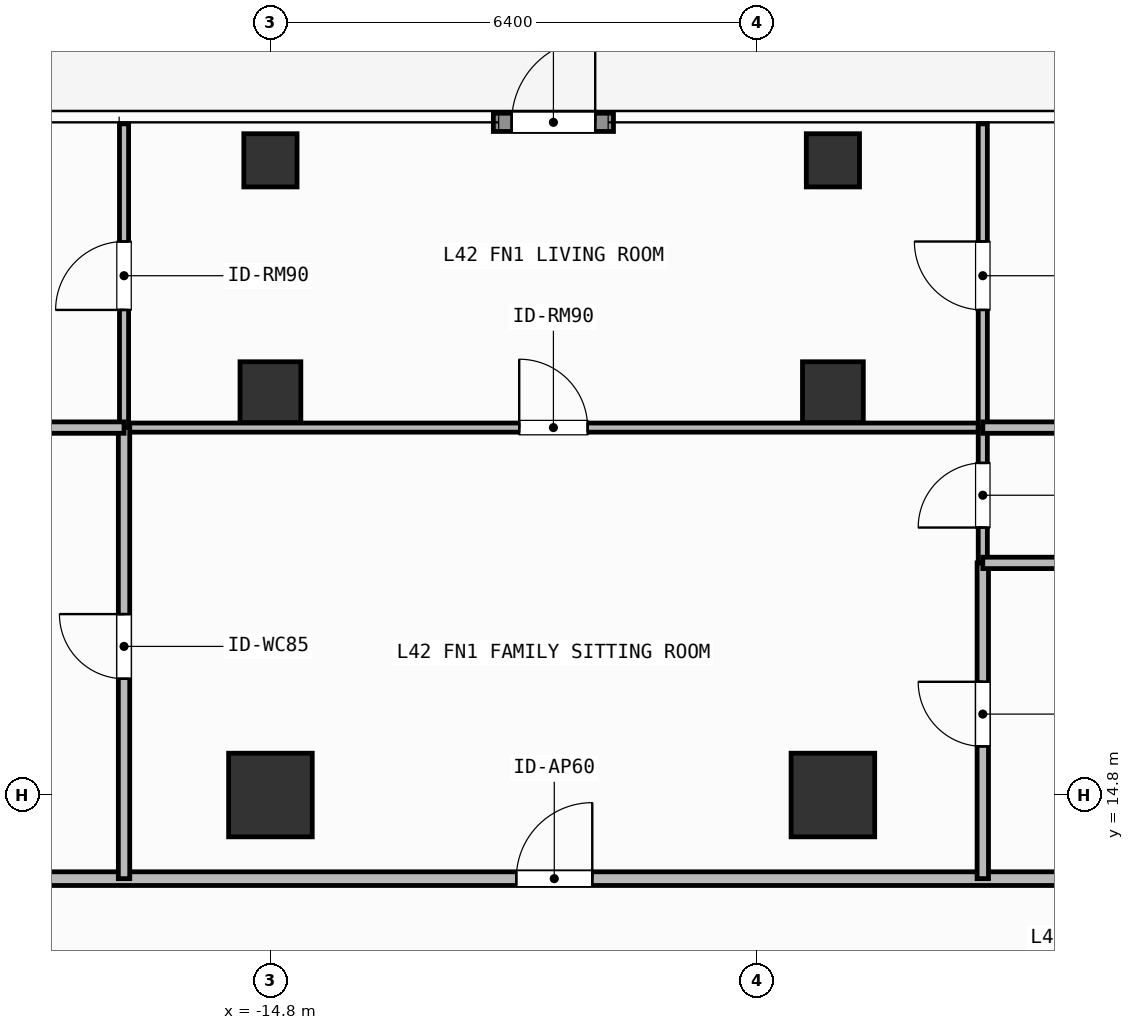
"""IFC4 building model, lengths in metres.
Left out: names, types, materials, properties, quantities, classifications, styles, units other than length and angle.
Written with IfcOpenShell. Run it as: python <this file> out.ifc"""

import sys

from ifc_helpers import new_model, si_unit, direction, frame, frame_2d, origin, origin_2d, place, context, subcontext, project, spatial, rectangle, hollow_rectangle, extrude, element, fill, save


model = new_model("IFC4")
c1 = context("Model", 3, precision=1e-05, world=origin(), true_north=direction((0.0, 1.0)))
c2 = subcontext(c1, "Body", "Model", "MODEL_VIEW")
j1 = project(units=[si_unit("LENGTHUNIT", "METRE"), si_unit("PLANEANGLEUNIT", "RADIAN")], contexts=[c1])
p1 = place(None, origin())
s1 = spatial("IfcSite", under=j1, at=p1, CompositionType="ELEMENT")
p2 = place(p1, origin())
s2 = spatial("IfcBuilding", under=s1, at=p2, CompositionType="ELEMENT")
p3 = place(p2, frame((0.0, 0.0, 171.9)))
s3 = spatial("IfcBuildingStorey", under=s2, at=p3, CompositionType="ELEMENT", Elevation=171.9)
for number, where, z_axis, x_axis in (
    (1, (-14.8, 14.8, 0.0), (0.0, 0.0, 1.0), (1.0, 0.0, 0.0)),
    (2, (-7.4, 14.8, 0.0), (0.0, 0.0, 1.0), (1.0, 0.0, 0.0)),
):
    element("IfcColumn", number, at=place(p3, frame(where, z_axis=z_axis, x_axis=x_axis)), inside=s3, PredefinedType="COLUMN", context=c2, shape_type="SweptSolid", body=[
        extrude(rectangle(XDim=1.1, YDim=1.1, at=origin_2d()), origin(), (0.0, 0.0, 1.0), 3.9),
    ])
for number, where, z_axis, x_axis in (
    (3, (-14.8, 20.1, 0.0), (0.0, 0.0, 1.0), (1.0, 0.0, 0.0)),
    (4, (-7.4, 20.1, 0.0), (0.0, 0.0, 1.0), (1.0, 0.0, 0.0)),
):
    element("IfcColumn", number, at=place(p3, frame(where, z_axis=z_axis, x_axis=x_axis)), inside=s3, PredefinedType="COLUMN", context=c2, shape_type="SweptSolid", body=[
        extrude(hollow_rectangle(XDim=0.8, YDim=0.8, WallThickness=0.036, at=origin_2d()), origin(), (0.0, 0.0, 1.0), 3.9),
    ])
for number, where, z_axis, x_axis in (
    (5, (-14.8, 23.15, 0.0), (0.0, 0.0, 1.0), (1.0, 0.0, 0.0)),
    (6, (-7.4, 23.15, 0.0), (0.0, 0.0, 1.0), (1.0, 0.0, 0.0)),
):
    element("IfcColumn", number, at=place(p3, frame(where, z_axis=z_axis, x_axis=x_axis)), inside=s3, PredefinedType="COLUMN", context=c2, shape_type="SweptSolid", body=[
        extrude(hollow_rectangle(XDim=0.7, YDim=0.7, WallThickness=0.032, at=origin_2d()), origin(), (0.0, 0.0, 1.0), 3.9),
    ])
p4 = place(p3, frame((-11.867, 23.65, 0.0), z_axis=(0.0, 0.0, 1.0), x_axis=(1.0, 0.0, 0.0)))
e7 = element("IfcWall", 7, at=p4, inside=s3, PredefinedType="SOLIDWALL", context=c2, shape_type="SweptSolid", body=[
    extrude(rectangle(XDim=1.58, YDim=0.24, at=frame_2d((0.79, 0.0))), origin(), (0.0, 0.0, 1.0), 3.68),
])
p5 = place(p4, frame((0.24, 0.0, 0.0)))
e8 = element("IfcOpeningElement", 8, at=p5, cuts=e7, PredefinedType="OPENING", context=c2, shape_type="SweptSolid", body=[
    extrude(rectangle(XDim=1.1, YDim=2.2, at=frame_2d((0.55, 1.1))), frame((0.0, 0.13, 0.0), z_axis=(0.0, -1.0, 0.0), x_axis=(1.0, 0.0, 0.0)), (0.0, 0.0, 1.0), 0.26),
])
p6 = place(p3, frame((-22.12, 13.7, 0.0), z_axis=(0.0, 0.0, 1.0), x_axis=(1.0, 0.0, 0.0)))
e9 = element("IfcWall", 9, at=p6, inside=s3, PredefinedType="PARTITIONING", context=c2, shape_type="SweptSolid", body=[
    extrude(rectangle(XDim=22.646, YDim=0.18, at=frame_2d((11.323, 0.0))), origin(), (0.0, 0.0, 1.0), 3.68),
])
p7 = place(p6, frame((10.554, 0.0, 0.0)))
e10 = element("IfcOpeningElement", 10, at=p7, cuts=e9, PredefinedType="OPENING", context=c2, shape_type="SweptSolid", body=[
    extrude(rectangle(XDim=1.0, YDim=2.2, at=frame_2d((0.5, 1.1))), frame((0.0, 0.1, 0.0), z_axis=(0.0, -1.0, 0.0), x_axis=(1.0, 0.0, 0.0)), (0.0, 0.0, 1.0), 0.2),
])
p8 = place(p3, frame((-16.726, 19.634, 0.0), z_axis=(0.0, 0.0, 1.0), x_axis=(1.0, 0.0, 0.0)))
e11 = element("IfcWall", 11, at=p8, inside=s3, PredefinedType="PARTITIONING", context=c2, shape_type="SweptSolid", body=[
    extrude(rectangle(XDim=11.298, YDim=0.12, at=frame_2d((5.649, 0.0))), origin(), (0.0, 0.0, 1.0), 3.68),
])
p9 = place(p8, frame((5.199, 0.0, 0.0)))
e12 = element("IfcOpeningElement", 12, at=p9, cuts=e11, PredefinedType="OPENING", context=c2, shape_type="SweptSolid", body=[
    extrude(rectangle(XDim=0.9, YDim=2.1, at=frame_2d((0.45, 1.05))), frame((0.0, 0.07, 0.0), z_axis=(0.0, -1.0, 0.0), x_axis=(1.0, 0.0, 0.0)), (0.0, 0.0, 1.0), 0.14),
])
p10 = place(p3, frame((-16.726, 13.7, 0.0), z_axis=(0.0, 0.0, 1.0), x_axis=(0.0, 1.0, 0.0)))
e13 = element("IfcWall", 13, at=p10, inside=s3, PredefinedType="PARTITIONING", context=c2, shape_type="SweptSolid", body=[
    extrude(rectangle(XDim=5.934, YDim=0.15, at=frame_2d((2.967, 0.0))), origin(), (0.0, 0.0, 1.0), 3.68),
])
p11 = place(p10, frame((2.63, 0.0, 0.0)))
e14 = element("IfcOpeningElement", 14, at=p11, cuts=e13, PredefinedType="OPENING", context=c2, shape_type="SweptSolid", body=[
    extrude(rectangle(XDim=0.85, YDim=2.1, at=frame_2d((0.425, 1.05))), frame((0.0, 0.085, 0.0), z_axis=(0.0, -1.0, 0.0), x_axis=(1.0, 0.0, 0.0)), (0.0, 0.0, 1.0), 0.17),
])
p12 = place(p3, frame((-16.726, 19.634, 0.0), z_axis=(0.0, 0.0, 1.0), x_axis=(0.0, 1.0, 0.0)))
e15 = element("IfcWall", 15, at=p12, inside=s3, PredefinedType="PARTITIONING", context=c2, shape_type="SweptSolid", body=[
    extrude(rectangle(XDim=3.996, YDim=0.12, at=frame_2d((1.998, 0.0))), origin(), (0.0, 0.0, 1.0), 3.68),
])
p13 = place(p12, frame((1.548, 0.0, 0.0)))
e16 = element("IfcOpeningElement", 16, at=p13, cuts=e15, PredefinedType="OPENING", context=c2, shape_type="SweptSolid", body=[
    extrude(rectangle(XDim=0.9, YDim=2.1, at=frame_2d((0.45, 1.05))), frame((0.0, 0.07, 0.0), z_axis=(0.0, -1.0, 0.0), x_axis=(1.0, 0.0, 0.0)), (0.0, 0.0, 1.0), 0.14),
])
p14 = place(p3, frame((-5.428, 13.7, 0.0), z_axis=(0.0, 0.0, 1.0), x_axis=(0.0, 1.0, 0.0)))
e17 = element("IfcWall", 17, at=p14, inside=s3, PredefinedType="PARTITIONING", context=c2, shape_type="SweptSolid", body=[
    extrude(rectangle(XDim=4.154, YDim=0.15, at=frame_2d((2.077, 0.0))), origin(), (0.0, 0.0, 1.0), 3.68),
])
p15 = place(p14, frame((1.74, 0.0, 0.0)))
e18 = element("IfcOpeningElement", 18, at=p15, cuts=e17, PredefinedType="OPENING", context=c2, shape_type="SweptSolid", body=[
    extrude(rectangle(XDim=0.85, YDim=2.1, at=frame_2d((0.425, 1.05))), frame((0.0, 0.085, 0.0), z_axis=(0.0, -1.0, 0.0), x_axis=(1.0, 0.0, 0.0)), (0.0, 0.0, 1.0), 0.17),
])
p16 = place(p3, frame((-5.428, 17.854, 0.0), z_axis=(0.0, 0.0, 1.0), x_axis=(0.0, 1.0, 0.0)))
e19 = element("IfcWall", 19, at=p16, inside=s3, PredefinedType="PARTITIONING", context=c2, shape_type="SweptSolid", body=[
    extrude(rectangle(XDim=1.78, YDim=0.12, at=frame_2d((0.89, 0.0))), origin(), (0.0, 0.0, 1.0), 3.68),
])
p17 = place(p16, frame((0.465, 0.0, 0.0)))
e20 = element("IfcOpeningElement", 20, at=p17, cuts=e19, PredefinedType="OPENING", context=c2, shape_type="SweptSolid", body=[
    extrude(rectangle(XDim=0.85, YDim=2.1, at=frame_2d((0.425, 1.05))), frame((0.0, 0.07, 0.0), z_axis=(0.0, -1.0, 0.0), x_axis=(1.0, 0.0, 0.0)), (0.0, 0.0, 1.0), 0.14),
])
p18 = place(p3, frame((-5.428, 19.634, 0.0), z_axis=(0.0, 0.0, 1.0), x_axis=(0.0, 1.0, 0.0)))
e21 = element("IfcWall", 21, at=p18, inside=s3, PredefinedType="PARTITIONING", context=c2, shape_type="SweptSolid", body=[
    extrude(rectangle(XDim=3.996, YDim=0.12, at=frame_2d((1.998, 0.0))), origin(), (0.0, 0.0, 1.0), 3.68),
])
p19 = place(p18, frame((1.548, 0.0, 0.0)))
e22 = element("IfcOpeningElement", 22, at=p19, cuts=e21, PredefinedType="OPENING", context=c2, shape_type="SweptSolid", body=[
    extrude(rectangle(XDim=0.9, YDim=2.1, at=frame_2d((0.45, 1.05))), frame((0.0, 0.07, 0.0), z_axis=(0.0, -1.0, 0.0), x_axis=(1.0, 0.0, 0.0)), (0.0, 0.0, 1.0), 0.14),
])
p20 = place(p3, frame((-22.12, 19.634, 0.0), z_axis=(0.0, 0.0, 1.0), x_axis=(1.0, 0.0, 0.0)))
e23 = element("IfcWall", 23, at=p20, inside=s3, PredefinedType="PARTITIONING", context=c2, shape_type="SweptSolid", body=[
    extrude(rectangle(XDim=5.394, YDim=0.15, at=frame_2d((2.697, 0.0))), origin(), (0.0, 0.0, 1.0), 3.68),
])
for number, where, z_axis, x_axis in (
    (24, (-5.428, 17.854, 0.0), (0.0, 0.0, 1.0), (1.0, 0.0, 0.0)),
    (25, (-5.428, 19.634, 0.0), (0.0, 0.0, 1.0), (1.0, 0.0, 0.0)),
):
    element("IfcWall", number, at=place(p3, frame(where, z_axis=z_axis, x_axis=x_axis)), inside=s3, PredefinedType="PARTITIONING", context=c2, shape_type="SweptSolid", body=[
        extrude(rectangle(XDim=5.954, YDim=0.15, at=frame_2d((2.977, 0.0))), origin(), (0.0, 0.0, 1.0), 3.68),
    ])
p21 = place(p5, origin())
e26 = element("IfcDoor", 26, at=p21, inside=s3, OperationType="SINGLE_SWING_RIGHT", PredefinedType="DOOR", context=c2, shape_type="SweptSolid", body=[
    extrude(rectangle(XDim=1.1, YDim=2.2, at=frame_2d((0.55, 1.1))), frame((0.0, 0.025, 0.0), z_axis=(0.0, -1.0, 0.0), x_axis=(1.0, 0.0, 0.0)), (0.0, 0.0, 1.0), 0.05),
])
fill(e8, e26)
p22 = place(p7, origin())
e27 = element("IfcDoor", 27, at=p22, inside=s3, OperationType="SINGLE_SWING_RIGHT", PredefinedType="DOOR", context=c2, shape_type="SweptSolid", body=[
    extrude(rectangle(XDim=1.0, YDim=2.2, at=frame_2d((0.5, 1.1))), frame((0.0, 0.025, 0.0), z_axis=(0.0, -1.0, 0.0), x_axis=(1.0, 0.0, 0.0)), (0.0, 0.0, 1.0), 0.05),
])
fill(e10, e27)
p23 = place(p9, origin())
e28 = element("IfcDoor", 28, at=p23, inside=s3, OperationType="SINGLE_SWING_LEFT", PredefinedType="DOOR", context=c2, shape_type="SweptSolid", body=[
    extrude(rectangle(XDim=0.9, YDim=2.1, at=frame_2d((0.45, 1.05))), frame((0.0, 0.025, 0.0), z_axis=(0.0, -1.0, 0.0), x_axis=(1.0, 0.0, 0.0)), (0.0, 0.0, 1.0), 0.05),
])
fill(e12, e28)
p24 = place(p11, origin())
e29 = element("IfcDoor", 29, at=p24, inside=s3, OperationType="SINGLE_SWING_RIGHT", PredefinedType="DOOR", context=c2, shape_type="SweptSolid", body=[
    extrude(rectangle(XDim=0.85, YDim=2.1, at=frame_2d((0.425, 1.05))), frame((0.0, 0.025, 0.0), z_axis=(0.0, -1.0, 0.0), x_axis=(1.0, 0.0, 0.0)), (0.0, 0.0, 1.0), 0.05),
])
fill(e14, e29)
p25 = place(p13, origin())
e30 = element("IfcDoor", 30, at=p25, inside=s3, OperationType="SINGLE_SWING_LEFT", PredefinedType="DOOR", context=c2, shape_type="SweptSolid", body=[
    extrude(rectangle(XDim=0.9, YDim=2.1, at=frame_2d((0.45, 1.05))), frame((0.0, 0.025, 0.0), z_axis=(0.0, -1.0, 0.0), x_axis=(1.0, 0.0, 0.0)), (0.0, 0.0, 1.0), 0.05),
])
fill(e16, e30)
p26 = place(p15, origin())
e31 = element("IfcDoor", 31, at=p26, inside=s3, OperationType="SINGLE_SWING_RIGHT", PredefinedType="DOOR", context=c2, shape_type="SweptSolid", body=[
    extrude(rectangle(XDim=0.85, YDim=2.1, at=frame_2d((0.425, 1.05))), frame((0.0, 0.025, 0.0), z_axis=(0.0, -1.0, 0.0), x_axis=(1.0, 0.0, 0.0)), (0.0, 0.0, 1.0), 0.05),
])
fill(e18, e31)
p27 = place(p17, origin())
e32 = element("IfcDoor", 32, at=p27, inside=s3, OperationType="SINGLE_SWING_LEFT", PredefinedType="DOOR", context=c2, shape_type="SweptSolid", body=[
    extrude(rectangle(XDim=0.85, YDim=2.1, at=frame_2d((0.425, 1.05))), frame((0.0, 0.025, 0.0), z_axis=(0.0, -1.0, 0.0), x_axis=(1.0, 0.0, 0.0)), (0.0, 0.0, 1.0), 0.05),
])
fill(e20, e32)
p28 = place(p19, origin())
e33 = element("IfcDoor", 33, at=p28, inside=s3, OperationType="SINGLE_SWING_RIGHT", PredefinedType="DOOR", context=c2, shape_type="SweptSolid", body=[
    extrude(rectangle(XDim=0.9, YDim=2.1, at=frame_2d((0.45, 1.05))), frame((0.0, 0.025, 0.0), z_axis=(0.0, -1.0, 0.0), x_axis=(1.0, 0.0, 0.0)), (0.0, 0.0, 1.0), 0.05),
])
fill(e22, e33)
save(model, sys.argv[1])
